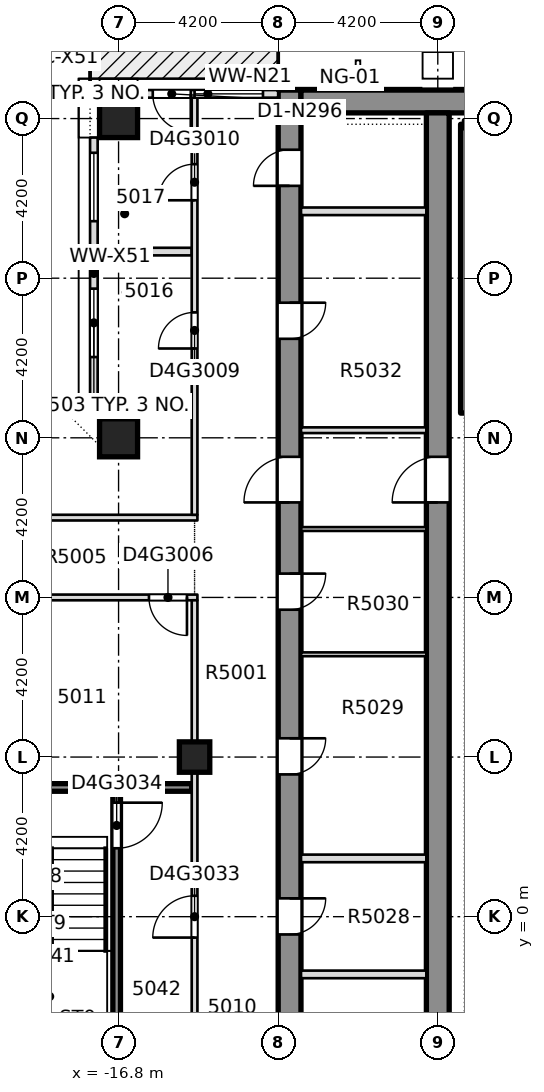
"""IFC4 building model, lengths in metres.
Left out: names, types, materials, properties, quantities, classifications, styles, units other than length and angle.
Written with IfcOpenShell. Run it as: python <this file> out.ifc"""

import sys

from ifc_helpers import new_model, si_unit, direction, frame, frame_2d, origin, origin_2d, place, context, subcontext, project, spatial, rectangle, extrude, element, fill, save


model = new_model("IFC4")
c1 = context("Model", 3, precision=1e-05, world=origin(), true_north=direction((0.0, 1.0)))
c2 = subcontext(c1, "Body", "Model", "MODEL_VIEW")
j1 = project(units=[si_unit("LENGTHUNIT", "METRE"), si_unit("PLANEANGLEUNIT", "RADIAN")], contexts=[c1])
p1 = place(None, origin())
s1 = spatial("IfcSite", under=j1, at=p1, CompositionType="ELEMENT")
p2 = place(p1, origin())
s2 = spatial("IfcBuilding", under=s1, at=p2, CompositionType="ELEMENT")
p3 = place(p2, frame((0.0, 0.0, 192.8)))
s3 = spatial("IfcBuildingStorey", under=s2, at=p3, CompositionType="ELEMENT", Elevation=192.8)
p4 = place(p3, frame((-12.3, -8.4, -0.4), z_axis=(0.0, 0.0, 1.0), x_axis=(0.0, 1.0, 0.0)))
e1 = element("IfcWall", 1, at=p4, inside=s3, PredefinedType="SHEAR", context=c2, shape_type="SweptSolid", body=[
    extrude(rectangle(XDim=30.15, YDim=0.6, at=frame_2d((15.075, 0.0))), origin(), (0.0, 0.0, 1.0), 3.45),
])
p5 = place(p4, frame((3.416, 0.0, 0.4)))
e2 = element("IfcOpeningElement", 2, at=p5, cuts=e1, PredefinedType="OPENING", context=c2, shape_type="SweptSolid", body=[
    extrude(rectangle(XDim=0.95, YDim=2.1, at=frame_2d((0.475, 1.05))), frame((0.0, 0.31, 0.0), z_axis=(0.0, -1.0, 0.0), x_axis=(1.0, 0.0, 0.0)), (0.0, 0.0, 1.0), 0.62),
])
p6 = place(p4, frame((7.932, 0.0, 0.4)))
e3 = element("IfcOpeningElement", 3, at=p6, cuts=e1, PredefinedType="OPENING", context=c2, shape_type="SweptSolid", body=[
    extrude(rectangle(XDim=0.95, YDim=2.1, at=frame_2d((0.475, 1.05))), frame((0.0, 0.31, 0.0), z_axis=(0.0, -1.0, 0.0), x_axis=(1.0, 0.0, 0.0)), (0.0, 0.0, 1.0), 0.62),
])
p7 = place(p4, frame((12.144, 0.0, 0.4)))
e4 = element("IfcOpeningElement", 4, at=p7, cuts=e1, PredefinedType="OPENING", context=c2, shape_type="SweptSolid", body=[
    extrude(rectangle(XDim=0.95, YDim=2.1, at=frame_2d((0.475, 1.05))), frame((0.0, 0.31, 0.0), z_axis=(0.0, -1.0, 0.0), x_axis=(1.0, 0.0, 0.0)), (0.0, 0.0, 1.0), 0.62),
])
p8 = place(p4, frame((16.477, 0.0, 0.4)))
e5 = element("IfcOpeningElement", 5, at=p8, cuts=e1, PredefinedType="OPENING", context=c2, shape_type="SweptSolid", body=[
    extrude(rectangle(XDim=0.95, YDim=2.1, at=frame_2d((0.475, 1.05))), frame((0.0, 0.31, 0.0), z_axis=(0.0, -1.0, 0.0), x_axis=(1.0, 0.0, 0.0)), (0.0, 0.0, 1.0), 0.62),
])
p9 = place(p4, frame((23.605, 0.0, 0.4)))
e6 = element("IfcOpeningElement", 6, at=p9, cuts=e1, PredefinedType="OPENING", context=c2, shape_type="SweptSolid", body=[
    extrude(rectangle(XDim=0.95, YDim=2.1, at=frame_2d((0.475, 1.05))), frame((0.0, 0.31, 0.0), z_axis=(0.0, -1.0, 0.0), x_axis=(1.0, 0.0, 0.0)), (0.0, 0.0, 1.0), 0.62),
])
p10 = place(p4, frame((27.63, 0.0, 0.4)))
e7 = element("IfcOpeningElement", 7, at=p10, cuts=e1, PredefinedType="OPENING", context=c2, shape_type="SweptSolid", body=[
    extrude(rectangle(XDim=0.95, YDim=2.1, at=frame_2d((0.475, 1.05))), frame((0.0, 0.31, 0.0), z_axis=(0.0, -1.0, 0.0), x_axis=(1.0, 0.0, 0.0)), (0.0, 0.0, 1.0), 0.62),
])
p11 = place(p4, frame((19.3, 0.0, 0.4)))
e8 = element("IfcOpeningElement", 8, at=p11, cuts=e1, PredefinedType="OPENING", context=c2, shape_type="SweptSolid", body=[
    extrude(rectangle(XDim=1.2, YDim=2.1, at=frame_2d((0.6, 1.05))), frame((0.0, 0.31, 0.0), z_axis=(0.0, -1.0, 0.0), x_axis=(1.0, 0.0, 0.0)), (0.0, 0.0, 1.0), 0.62),
])
p12 = place(p3, frame((-12.0, 21.45, -0.4), z_axis=(0.0, 0.0, 1.0), x_axis=(1.0, 0.0, 0.0)))
e9 = element("IfcWall", 9, at=p12, inside=s3, PredefinedType="SHEAR", context=c2, shape_type="SweptSolid", body=[
    extrude(rectangle(XDim=24.0, YDim=0.6, at=frame_2d((12.0, 0.0))), origin(), (0.0, 0.0, 1.0), 3.45),
])
p13 = place(p3, frame((-8.4, -7.8, -0.4), z_axis=(0.0, 0.0, 1.0), x_axis=(0.0, 1.0, 0.0)))
e10 = element("IfcWall", 10, at=p13, inside=s3, PredefinedType="SHEAR", context=c2, shape_type="SweptSolid", body=[
    extrude(rectangle(XDim=28.95, YDim=0.6, at=frame_2d((14.475, 0.0))), origin(), (0.0, 0.0, 1.0), 3.45),
])
p14 = place(p13, frame((18.7, 0.0, 0.4)))
e11 = element("IfcOpeningElement", 11, at=p14, cuts=e10, PredefinedType="OPENING", context=c2, shape_type="SweptSolid", body=[
    extrude(rectangle(XDim=1.2, YDim=2.1, at=frame_2d((0.6, 1.05))), frame((0.0, 0.31, 0.0), z_axis=(0.0, -1.0, 0.0), x_axis=(1.0, 0.0, 0.0)), (0.0, 0.0, 1.0), 0.62),
])
for number, where, z_axis, x_axis in (
    (12, (-16.8, 12.6, -0.4), (0.0, 0.0, 1.0), (1.0, 0.0, 0.0)),
    (13, (-16.8, 21.0, -0.4), (0.0, 0.0, 1.0), (1.0, 0.0, 0.0)),
):
    element("IfcColumn", number, at=place(p3, frame(where, z_axis=z_axis, x_axis=x_axis)), inside=s3, PredefinedType="COLUMN", context=c2, shape_type="SweptSolid", body=[
        extrude(rectangle(XDim=1.0, YDim=1.0, at=origin_2d()), origin(), (0.0, 0.0, 1.0), 3.45),
    ])
p15 = place(p3, frame((-14.8, 4.2, -0.4), z_axis=(0.0, 0.0, 1.0), x_axis=(1.0, 0.0, 0.0)))
e14 = element("IfcColumn", 14, at=p15, inside=s3, PredefinedType="COLUMN", context=c2, shape_type="SweptSolid", body=[
    extrude(rectangle(XDim=0.8, YDim=0.8, at=origin_2d()), origin(), (0.0, 0.0, 1.0), 3.45),
])
p16 = place(p3, frame((-20.45, 3.4, 0.0), z_axis=(0.0, 0.0, 1.0), x_axis=(1.0, 0.0, 0.0)))
e15 = element("IfcWall", 15, at=p16, inside=s3, PredefinedType="SOLIDWALL", context=c2, shape_type="SweptSolid", body=[
    extrude(rectangle(XDim=5.575, YDim=0.2, at=frame_2d((2.788, 0.0))), origin(), (0.0, 0.0, 1.0), 3.05),
])
p17 = place(p3, frame((-25.75, 8.4, 0.0), z_axis=(0.0, 0.0, 1.0), x_axis=(1.0, 0.0, 0.0)))
e16 = element("IfcWall", 16, at=p17, inside=s3, PredefinedType="PARTITIONING", context=c2, shape_type="SweptSolid", body=[
    extrude(rectangle(XDim=11.025, YDim=0.15, at=frame_2d((5.512, 0.0))), origin(), (0.0, 0.0, 1.0), 3.05),
])
p18 = place(p17, frame((9.75, 0.0, 0.0)))
e17 = element("IfcOpeningElement", 17, at=p18, cuts=e16, PredefinedType="OPENING", context=c2, shape_type="SweptSolid", body=[
    extrude(rectangle(XDim=1.0, YDim=2.1, at=frame_2d((0.5, 1.05))), frame((0.0, 0.085, 0.0), z_axis=(0.0, -1.0, 0.0), x_axis=(1.0, 0.0, 0.0)), (0.0, 0.0, 1.0), 0.17),
])
p19 = place(p3, frame((-25.75, 10.5, 0.0), z_axis=(0.0, 0.0, 1.0), x_axis=(1.0, 0.0, 0.0)))
e18 = element("IfcWall", 18, at=p19, inside=s3, PredefinedType="PARTITIONING", context=c2, shape_type="SweptSolid", body=[
    extrude(rectangle(XDim=11.025, YDim=0.15, at=frame_2d((5.512, 0.0))), origin(), (0.0, 0.0, 1.0), 3.05),
])
p20 = place(p19, frame((4.875, 0.0, 0.0)))
e19 = element("IfcOpeningElement", 19, at=p20, cuts=e18, PredefinedType="OPENING", context=c2, shape_type="SweptSolid", body=[
    extrude(rectangle(XDim=1.0, YDim=2.1, at=frame_2d((0.5, 1.05))), frame((0.0, 0.085, 0.0), z_axis=(0.0, -1.0, 0.0), x_axis=(1.0, 0.0, 0.0)), (0.0, 0.0, 1.0), 0.17),
])
for number, where, z_axis, x_axis in (
    (20, (-17.35, 13.35, 0.0), (0.0, 0.0, 1.0), (1.0, 0.0, 0.0)),
    (21, (-17.35, 17.5, 0.0), (0.0, 0.0, 1.0), (1.0, 0.0, 0.0)),
):
    element("IfcWall", number, at=place(p3, frame(where, z_axis=z_axis, x_axis=x_axis)), inside=s3, PredefinedType="PARTITIONING", context=c2, shape_type="SweptSolid", body=[
        extrude(rectangle(XDim=2.475, YDim=0.2, at=frame_2d((1.238, 0.0))), origin(), (0.0, 0.0, 1.0), 3.05),
    ])
p21 = place(p3, frame((-16.85, -3.35, 0.0), z_axis=(0.0, 0.0, 1.0), x_axis=(0.0, 1.0, 0.0)))
e22 = element("IfcWall", 22, at=p21, inside=s3, PredefinedType="SOLIDWALL", context=c2, shape_type="SweptSolid", body=[
    extrude(rectangle(XDim=6.65, YDim=0.2, at=frame_2d((3.325, 0.0))), origin(), (0.0, 0.0, 1.0), 3.05),
])
p22 = place(p21, frame((5.15, 0.0, 0.0)))
e23 = element("IfcOpeningElement", 23, at=p22, cuts=e22, PredefinedType="OPENING", context=c2, shape_type="SweptSolid", body=[
    extrude(rectangle(XDim=1.2, YDim=2.1, at=frame_2d((0.6, 1.05))), frame((0.0, 0.11, 0.0), z_axis=(0.0, -1.0, 0.0), x_axis=(1.0, 0.0, 0.0)), (0.0, 0.0, 1.0), 0.22),
])
p23 = place(p3, frame((-14.8, -3.35, 0.0), z_axis=(0.0, 0.0, 1.0), x_axis=(0.0, 1.0, 0.0)))
e24 = element("IfcWall", 24, at=p23, inside=s3, PredefinedType="PARTITIONING", context=c2, shape_type="SweptSolid", body=[
    extrude(rectangle(XDim=11.675, YDim=0.15, at=frame_2d((5.837, 0.0))), origin(), (0.0, 0.0, 1.0), 3.05),
])
p24 = place(p23, frame((2.8, 0.0, 0.0)))
e25 = element("IfcOpeningElement", 25, at=p24, cuts=e24, PredefinedType="OPENING", context=c2, shape_type="SweptSolid", body=[
    extrude(rectangle(XDim=1.1, YDim=2.1, at=frame_2d((0.55, 1.05))), frame((0.0, 0.085, 0.0), z_axis=(0.0, -1.0, 0.0), x_axis=(1.0, 0.0, 0.0)), (0.0, 0.0, 1.0), 0.17),
])
p25 = place(p3, frame((-14.8, 10.575, 0.0), z_axis=(0.0, 0.0, 1.0), x_axis=(0.0, 1.0, 0.0)))
e26 = element("IfcWall", 26, at=p25, inside=s3, PredefinedType="PARTITIONING", context=c2, shape_type="SweptSolid", body=[
    extrude(rectangle(XDim=10.975, YDim=0.15, at=frame_2d((5.488, 0.0))), origin(), (0.0, 0.0, 1.0), 3.05),
])
p26 = place(p25, frame((4.375, 0.0, 0.0)))
e27 = element("IfcOpeningElement", 27, at=p26, cuts=e26, PredefinedType="OPENING", context=c2, shape_type="SweptSolid", body=[
    extrude(rectangle(XDim=0.95, YDim=2.1, at=frame_2d((0.475, 1.05))), frame((0.0, 0.085, 0.0), z_axis=(0.0, -1.0, 0.0), x_axis=(1.0, 0.0, 0.0)), (0.0, 0.0, 1.0), 0.17),
])
p27 = place(p25, frame((8.275, 0.0, 0.0)))
e28 = element("IfcOpeningElement", 28, at=p27, cuts=e26, PredefinedType="OPENING", context=c2, shape_type="SweptSolid", body=[
    extrude(rectangle(XDim=0.95, YDim=2.1, at=frame_2d((0.475, 1.05))), frame((0.0, 0.085, 0.0), z_axis=(0.0, -1.0, 0.0), x_axis=(1.0, 0.0, 0.0)), (0.0, 0.0, 1.0), 0.17),
])
p28 = place(p3, frame((-12.6, 21.65, 0.0), z_axis=(0.0, 0.0, 1.0), x_axis=(-1.0, 0.0, 0.0)))
e29 = element("IfcWall", 29, at=p28, inside=s3, PredefinedType="STANDARD", context=c2, shape_type="SweptSolid", body=[
    extrude(rectangle(XDim=3.7, YDim=0.2, at=frame_2d((1.85, 0.0))), origin(), (0.0, 0.0, 1.0), 3.05),
])
p29 = place(p28, frame((0.4, 0.0, 0.2)))
e30 = element("IfcOpeningElement", 30, at=p29, cuts=e29, PredefinedType="OPENING", context=c2, shape_type="SweptSolid", body=[
    extrude(rectangle(XDim=1.8, YDim=2.65, at=frame_2d((0.9, 1.325))), frame((0.0, 0.11, 0.0), z_axis=(0.0, -1.0, 0.0), x_axis=(1.0, 0.0, 0.0)), (0.0, 0.0, 1.0), 0.22),
])
p30 = place(p28, frame((2.3, 0.0, 0.0)))
e31 = element("IfcOpeningElement", 31, at=p30, cuts=e29, PredefinedType="OPENING", context=c2, shape_type="SweptSolid", body=[
    extrude(rectangle(XDim=1.0, YDim=2.4, at=frame_2d((0.5, 1.2))), frame((0.0, 0.11, 0.0), z_axis=(0.0, -1.0, 0.0), x_axis=(1.0, 0.0, 0.0)), (0.0, 0.0, 1.0), 0.22),
])
p31 = place(p3, frame((-17.45, 20.5, 0.0), z_axis=(0.0, 0.0, 1.0), x_axis=(0.0, -1.0, 0.0)))
e32 = element("IfcWall", 32, at=p31, inside=s3, PredefinedType="STANDARD", context=c2, shape_type="SweptSolid", body=[
    extrude(rectangle(XDim=7.15, YDim=0.2, at=frame_2d((3.575, 0.0))), origin(), (0.0, 0.0, 1.0), 3.05),
])
p32 = place(p31, frame((3.975, 0.0, 0.2)))
e33 = element("IfcOpeningElement", 33, at=p32, cuts=e32, PredefinedType="OPENING", context=c2, shape_type="SweptSolid", body=[
    extrude(rectangle(XDim=1.8, YDim=2.65, at=frame_2d((0.9, 1.325))), frame((0.0, 0.11, 0.0), z_axis=(0.0, -1.0, 0.0), x_axis=(1.0, 0.0, 0.0)), (0.0, 0.0, 1.0), 0.22),
])
p33 = place(p31, frame((0.4, 0.0, 0.2)))
e34 = element("IfcOpeningElement", 34, at=p33, cuts=e32, PredefinedType="OPENING", context=c2, shape_type="SweptSolid", body=[
    extrude(rectangle(XDim=1.8, YDim=2.65, at=frame_2d((0.9, 1.325))), frame((0.0, 0.11, 0.0), z_axis=(0.0, -1.0, 0.0), x_axis=(1.0, 0.0, 0.0)), (0.0, 0.0, 1.0), 0.22),
])
p34 = place(p3, frame((-17.55, 13.25, 0.0), z_axis=(0.0, 0.0, 1.0), x_axis=(-1.0, 0.0, 0.0)))
e35 = element("IfcWall", 35, at=p34, inside=s3, PredefinedType="STANDARD", context=c2, shape_type="SweptSolid", body=[
    extrude(rectangle(XDim=7.15, YDim=0.2, at=frame_2d((3.575, 0.0))), origin(), (0.0, 0.0, 1.0), 3.05),
])
for number, where, z_axis, x_axis in (
    (36, (-11.999, -1.519, 0.0), (0.0, 0.0, 1.0), (1.0, 0.0, 0.0)),
    (37, (-11.999, 1.533, 0.0), (0.0, 0.0, 1.0), (1.0, 0.0, 0.0)),
):
    element("IfcWall", number, at=place(p3, frame(where, z_axis=z_axis, x_axis=x_axis)), inside=s3, PredefinedType="PARTITIONING", context=c2, shape_type="SweptSolid", body=[
        extrude(rectangle(XDim=3.298, YDim=0.2, at=frame_2d((1.649, 0.0))), origin(), (0.0, 0.0, 1.0), 3.05),
    ])
for number, where, z_axis, x_axis in (
    (38, (-11.999, 6.904, 0.0), (0.0, 0.0, 1.0), (1.0, 0.0, 0.0)),
    (39, (-11.999, 10.2, 0.0), (0.0, 0.0, 1.0), (1.0, 0.0, 0.0)),
):
    element("IfcWall", number, at=place(p3, frame(where, z_axis=z_axis, x_axis=x_axis)), inside=s3, PredefinedType="PARTITIONING", context=c2, shape_type="SweptSolid", body=[
        extrude(rectangle(XDim=3.298, YDim=0.1, at=frame_2d((1.649, 0.0))), origin(), (0.0, 0.0, 1.0), 3.05),
    ])
p35 = place(p3, frame((-11.999, 12.8, 0.0), z_axis=(0.0, 0.0, 1.0), x_axis=(1.0, 0.0, 0.0)))
e40 = element("IfcWall", 40, at=p35, inside=s3, PredefinedType="PARTITIONING", context=c2, shape_type="SweptSolid", body=[
    extrude(rectangle(XDim=3.298, YDim=0.15, at=frame_2d((1.649, 0.0))), origin(), (0.0, 0.0, 1.0), 3.05),
])
p36 = place(p3, frame((-11.999, 18.56, 0.0), z_axis=(0.0, 0.0, 1.0), x_axis=(1.0, 0.0, 0.0)))
e41 = element("IfcWall", 41, at=p36, inside=s3, PredefinedType="PARTITIONING", context=c2, shape_type="SweptSolid", body=[
    extrude(rectangle(XDim=3.298, YDim=0.2, at=frame_2d((1.649, 0.0))), origin(), (0.0, 0.0, 1.0), 3.05),
])
p37 = place(p3, frame((-7.7, 13.25, 0.0), z_axis=(0.0, 0.0, 1.0), x_axis=(0.0, 1.0, 0.0)))
e42 = element("IfcWall", 42, at=p37, inside=s3, PredefinedType="SOLIDWALL", context=c2, shape_type="SweptSolid", body=[
    extrude(rectangle(XDim=7.6, YDim=0.2, at=frame_2d((3.8, 0.0))), origin(), (0.0, 0.0, 1.0), 3.05),
])
p38 = place(p3, frame((-7.7, 20.85, 0.0), z_axis=(0.0, 0.0, 1.0), x_axis=(1.0, 0.0, 0.0)))
e43 = element("IfcWall", 43, at=p38, inside=s3, PredefinedType="SOLIDWALL", context=c2, shape_type="SweptSolid", body=[
    extrude(rectangle(XDim=3.55, YDim=0.2, at=frame_2d((1.775, 0.0))), origin(), (0.0, 0.0, 1.0), 3.05),
])
p39 = place(p18, origin())
e44 = element("IfcDoor", 44, at=p39, inside=s3, OperationType="SINGLE_SWING_RIGHT", PredefinedType="DOOR", context=c2, shape_type="SweptSolid", body=[
    extrude(rectangle(XDim=1.0, YDim=2.1, at=frame_2d((0.5, 1.05))), frame((0.0, 0.025, 0.0), z_axis=(0.0, -1.0, 0.0), x_axis=(1.0, 0.0, 0.0)), (0.0, 0.0, 1.0), 0.05),
])
fill(e17, e44)
p40 = place(p26, origin())
e45 = element("IfcDoor", 45, at=p40, inside=s3, OperationType="SINGLE_SWING_LEFT", PredefinedType="DOOR", context=c2, shape_type="SweptSolid", body=[
    extrude(rectangle(XDim=0.95, YDim=2.1, at=frame_2d((0.475, 1.05))), frame((0.0, 0.025, 0.0), z_axis=(0.0, -1.0, 0.0), x_axis=(1.0, 0.0, 0.0)), (0.0, 0.0, 1.0), 0.05),
])
fill(e27, e45)
p41 = place(p27, origin())
e46 = element("IfcDoor", 46, at=p41, inside=s3, OperationType="SINGLE_SWING_RIGHT", PredefinedType="DOOR", context=c2, shape_type="SweptSolid", body=[
    extrude(rectangle(XDim=0.95, YDim=2.1, at=frame_2d((0.475, 1.05))), frame((0.0, 0.025, 0.0), z_axis=(0.0, -1.0, 0.0), x_axis=(1.0, 0.0, 0.0)), (0.0, 0.0, 1.0), 0.05),
])
fill(e28, e46)
p42 = place(p24, origin())
e47 = element("IfcDoor", 47, at=p42, inside=s3, OperationType="SINGLE_SWING_RIGHT", PredefinedType="DOOR", context=c2, shape_type="SweptSolid", body=[
    extrude(rectangle(XDim=1.1, YDim=2.1, at=frame_2d((0.55, 1.05))), frame((0.0, 0.025, 0.0), z_axis=(0.0, -1.0, 0.0), x_axis=(1.0, 0.0, 0.0)), (0.0, 0.0, 1.0), 0.05),
])
fill(e25, e47)
p43 = place(p22, origin())
e48 = element("IfcDoor", 48, at=p43, inside=s3, OperationType="SINGLE_SWING_RIGHT", PredefinedType="DOOR", context=c2, shape_type="SweptSolid", body=[
    extrude(rectangle(XDim=1.2, YDim=2.1, at=frame_2d((0.6, 1.05))), frame((0.0, 0.025, 0.0), z_axis=(0.0, -1.0, 0.0), x_axis=(1.0, 0.0, 0.0)), (0.0, 0.0, 1.0), 0.05),
])
fill(e23, e48)
p44 = place(p29, origin())
e49 = element("IfcWindow", 49, at=p44, inside=s3, PartitioningType="SINGLE_PANEL", PredefinedType="WINDOW", context=c2, shape_type="SweptSolid", body=[
    extrude(rectangle(XDim=1.8, YDim=2.65, at=frame_2d((0.9, 1.325))), frame((0.0, 0.03, 0.0), z_axis=(0.0, -1.0, 0.0), x_axis=(1.0, 0.0, 0.0)), (0.0, 0.0, 1.0), 0.06),
])
fill(e30, e49)
p45 = place(p30, origin())
e50 = element("IfcDoor", 50, at=p45, inside=s3, OperationType="SINGLE_SWING_LEFT", PredefinedType="DOOR", context=c2, shape_type="SweptSolid", body=[
    extrude(rectangle(XDim=1.0, YDim=2.4, at=frame_2d((0.5, 1.2))), frame((0.0, 0.025, 0.0), z_axis=(0.0, -1.0, 0.0), x_axis=(1.0, 0.0, 0.0)), (0.0, 0.0, 1.0), 0.05),
])
fill(e31, e50)
p46 = place(p32, origin())
e51 = element("IfcWindow", 51, at=p46, inside=s3, PartitioningType="SINGLE_PANEL", PredefinedType="WINDOW", context=c2, shape_type="SweptSolid", body=[
    extrude(rectangle(XDim=1.8, YDim=2.65, at=frame_2d((0.9, 1.325))), frame((0.0, 0.03, 0.0), z_axis=(0.0, -1.0, 0.0), x_axis=(1.0, 0.0, 0.0)), (0.0, 0.0, 1.0), 0.06),
])
fill(e33, e51)
p47 = place(p33, origin())
e52 = element("IfcWindow", 52, at=p47, inside=s3, PartitioningType="SINGLE_PANEL", PredefinedType="WINDOW", context=c2, shape_type="SweptSolid", body=[
    extrude(rectangle(XDim=1.8, YDim=2.65, at=frame_2d((0.9, 1.325))), frame((0.0, 0.03, 0.0), z_axis=(0.0, -1.0, 0.0), x_axis=(1.0, 0.0, 0.0)), (0.0, 0.0, 1.0), 0.06),
])
fill(e34, e52)
p48 = place(p6, origin())
e53 = element("IfcDoor", 53, at=p48, inside=s3, OperationType="SINGLE_SWING_LEFT", PredefinedType="DOOR", context=c2, shape_type="SweptSolid", body=[
    extrude(rectangle(XDim=0.95, YDim=2.1, at=frame_2d((0.475, 1.05))), frame((0.0, 0.025, 0.0), z_axis=(0.0, -1.0, 0.0), x_axis=(1.0, 0.0, 0.0)), (0.0, 0.0, 1.0), 0.05),
])
fill(e3, e53)
p49 = place(p7, origin())
e54 = element("IfcDoor", 54, at=p49, inside=s3, OperationType="SINGLE_SWING_LEFT", PredefinedType="DOOR", context=c2, shape_type="SweptSolid", body=[
    extrude(rectangle(XDim=0.95, YDim=2.1, at=frame_2d((0.475, 1.05))), frame((0.0, 0.025, 0.0), z_axis=(0.0, -1.0, 0.0), x_axis=(1.0, 0.0, 0.0)), (0.0, 0.0, 1.0), 0.05),
])
fill(e4, e54)
p50 = place(p8, origin())
e55 = element("IfcDoor", 55, at=p50, inside=s3, OperationType="SINGLE_SWING_LEFT", PredefinedType="DOOR", context=c2, shape_type="SweptSolid", body=[
    extrude(rectangle(XDim=0.95, YDim=2.1, at=frame_2d((0.475, 1.05))), frame((0.0, 0.025, 0.0), z_axis=(0.0, -1.0, 0.0), x_axis=(1.0, 0.0, 0.0)), (0.0, 0.0, 1.0), 0.05),
])
fill(e5, e55)
p51 = place(p9, origin())
e56 = element("IfcDoor", 56, at=p51, inside=s3, OperationType="SINGLE_SWING_LEFT", PredefinedType="DOOR", context=c2, shape_type="SweptSolid", body=[
    extrude(rectangle(XDim=0.95, YDim=2.1, at=frame_2d((0.475, 1.05))), frame((0.0, 0.025, 0.0), z_axis=(0.0, -1.0, 0.0), x_axis=(1.0, 0.0, 0.0)), (0.0, 0.0, 1.0), 0.05),
])
fill(e6, e56)
p52 = place(p10, origin())
e57 = element("IfcDoor", 57, at=p52, inside=s3, OperationType="SINGLE_SWING_LEFT", PredefinedType="DOOR", context=c2, shape_type="SweptSolid", body=[
    extrude(rectangle(XDim=0.95, YDim=2.1, at=frame_2d((0.475, 1.05))), frame((0.0, 0.025, 0.0), z_axis=(0.0, -1.0, 0.0), x_axis=(1.0, 0.0, 0.0)), (0.0, 0.0, 1.0), 0.05),
])
fill(e7, e57)
p53 = place(p11, origin())
e58 = element("IfcDoor", 58, at=p53, inside=s3, OperationType="SINGLE_SWING_LEFT", PredefinedType="DOOR", context=c2, shape_type="SweptSolid", body=[
    extrude(rectangle(XDim=1.2, YDim=2.1, at=frame_2d((0.6, 1.05))), frame((0.0, 0.025, 0.0), z_axis=(0.0, -1.0, 0.0), x_axis=(1.0, 0.0, 0.0)), (0.0, 0.0, 1.0), 0.05),
])
fill(e8, e58)
p54 = place(p14, origin())
e59 = element("IfcDoor", 59, at=p54, inside=s3, OperationType="SINGLE_SWING_LEFT", PredefinedType="DOOR", context=c2, shape_type="SweptSolid", body=[
    extrude(rectangle(XDim=1.2, YDim=2.1, at=frame_2d((0.6, 1.05))), frame((0.0, 0.025, 0.0), z_axis=(0.0, -1.0, 0.0), x_axis=(1.0, 0.0, 0.0)), (0.0, 0.0, 1.0), 0.05),
])
fill(e11, e59)
save(model, sys.argv[1])
